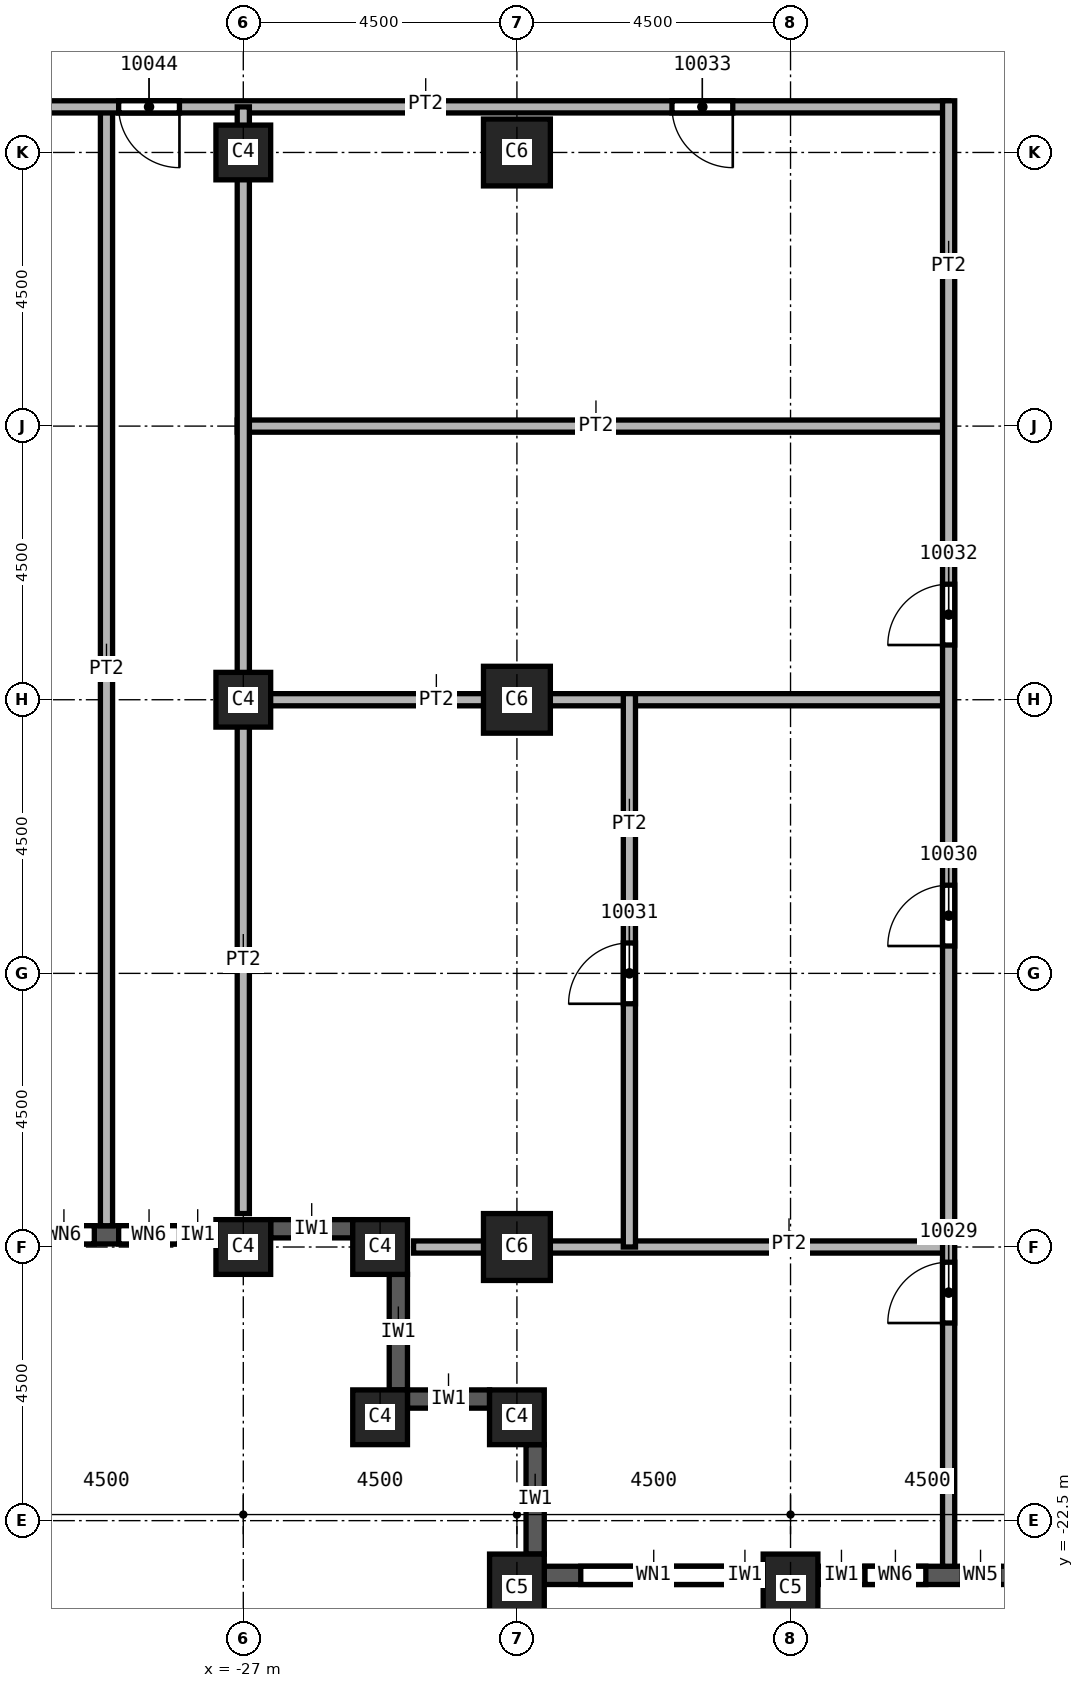
"""IFC4 building model, lengths in metres.
Left out: names, types, materials, properties, quantities, classifications, styles, units other than length and angle.
Written with IfcOpenShell. Run it as: python <this file> out.ifc"""

import sys

from ifc_helpers import new_model, si_unit, direction, frame, frame_2d, origin, origin_2d, place, context, subcontext, project, spatial, rectangle, extrude, element, fill, save


model = new_model("IFC4")
c1 = context("Model", 3, precision=1e-05, world=origin(), true_north=direction((0.0, 1.0)))
c2 = subcontext(c1, "Body", "Model", "MODEL_VIEW")
j1 = project(units=[si_unit("LENGTHUNIT", "METRE"), si_unit("PLANEANGLEUNIT", "RADIAN")], contexts=[c1])
p1 = place(None, origin())
s1 = spatial("IfcSite", under=j1, at=p1, CompositionType="ELEMENT")
p2 = place(p1, origin())
s2 = spatial("IfcBuilding", under=s1, at=p2, CompositionType="ELEMENT")
p3 = place(p2, frame((0.0, 0.0, 174.0)))
s3 = spatial("IfcBuildingStorey", under=s2, at=p3, CompositionType="ELEMENT", Elevation=174.0)
for number, where, z_axis, x_axis in (
    (1, (-22.5, 0.0, 0.0), (0.0, 0.0, 1.0), (1.0, 0.0, 0.0)),
    (2, (-22.5, -9.0, 0.0), (0.0, 0.0, 1.0), (1.0, 0.0, 0.0)),
    (3, (-22.5, -18.0, 0.0), (0.0, 0.0, 1.0), (1.0, 0.0, 0.0)),
):
    element("IfcColumn", number, at=place(p3, frame(where, z_axis=z_axis, x_axis=x_axis)), inside=s3, PredefinedType="COLUMN", context=c2, shape_type="SweptSolid", body=[
        extrude(rectangle(XDim=1.1, YDim=1.1, at=origin_2d()), origin(), (0.0, 0.0, 1.0), 3.59),
    ])
for number, where, z_axis, x_axis in (
    (4, (-18.0, -23.6, 0.0), (0.0, 0.0, 1.0), (1.0, 0.0, 0.0)),
    (5, (-22.5, -23.6, 0.0), (0.0, 0.0, 1.0), (1.0, 0.0, 0.0)),
):
    element("IfcColumn", number, at=place(p3, frame(where, z_axis=z_axis, x_axis=x_axis)), inside=s3, PredefinedType="COLUMN", context=c2, shape_type="SweptSolid", body=[
        extrude(rectangle(XDim=0.9, YDim=1.1, at=origin_2d()), origin(), (0.0, 0.0, 1.0), 3.59),
    ])
for number, where, z_axis, x_axis in (
    (6, (-27.0, 0.0, 0.0), (0.0, 0.0, 1.0), (1.0, 0.0, 0.0)),
    (7, (-27.0, -9.0, 0.0), (0.0, 0.0, 1.0), (1.0, 0.0, 0.0)),
    (8, (-27.0, -18.0, 0.0), (0.0, 0.0, 1.0), (1.0, 0.0, 0.0)),
    (9, (-22.5, -20.8, 0.0), (0.0, 0.0, 1.0), (1.0, 0.0, 0.0)),
    (10, (-24.75, -20.8, 0.0), (0.0, 0.0, 1.0), (1.0, 0.0, 0.0)),
    (11, (-24.75, -18.0, 0.0), (0.0, 0.0, 1.0), (1.0, 0.0, 0.0)),
):
    element("IfcColumn", number, at=place(p3, frame(where, z_axis=z_axis, x_axis=x_axis)), inside=s3, PredefinedType="COLUMN", context=c2, shape_type="SweptSolid", body=[
        extrude(rectangle(XDim=0.9, YDim=0.9, at=origin_2d()), origin(), (0.0, 0.0, 1.0), 3.59),
    ])
p4 = place(p3, frame((-31.05, -17.8, 0.0), z_axis=(0.0, 0.0, 1.0), x_axis=(1.0, 0.0, 0.0)))
e12 = element("IfcWall", 12, at=p4, inside=s3, PredefinedType="SOLIDWALL", context=c2, shape_type="SweptSolid", body=[
    extrude(rectangle(XDim=3.6, YDim=0.3, at=frame_2d((1.8, 0.0))), origin(), (0.0, 0.0, 1.0), 2.99),
])
p5 = place(p4, frame((0.6, 0.0, 0.8)))
e13 = element("IfcOpeningElement", 13, at=p5, cuts=e12, PredefinedType="OPENING", context=c2, shape_type="SweptSolid", body=[
    extrude(rectangle(XDim=1.0, YDim=1.95, at=frame_2d((0.5, 0.975))), frame((0.0, 0.15, 0.0), z_axis=(0.0, -1.0, 0.0), x_axis=(1.0, 0.0, 0.0)), (0.0, 0.0, 1.0), 0.3),
])
p6 = place(p4, frame((2.0, 0.0, 0.8)))
e14 = element("IfcOpeningElement", 14, at=p6, cuts=e12, PredefinedType="OPENING", context=c2, shape_type="SweptSolid", body=[
    extrude(rectangle(XDim=1.0, YDim=1.95, at=frame_2d((0.5, 0.975))), frame((0.0, 0.15, 0.0), z_axis=(0.0, -1.0, 0.0), x_axis=(1.0, 0.0, 0.0)), (0.0, 0.0, 1.0), 0.3),
])
p7 = place(p3, frame((-26.55, -17.7, 0.0), z_axis=(0.0, 0.0, 1.0), x_axis=(1.0, 0.0, 0.0)))
e15 = element("IfcWall", 15, at=p7, inside=s3, PredefinedType="SOLIDWALL", context=c2, shape_type="SweptSolid", body=[
    extrude(rectangle(XDim=1.35, YDim=0.3, at=frame_2d((0.675, 0.0))), origin(), (0.0, 0.0, 1.0), 2.99),
])
p8 = place(p3, frame((-24.45, -18.45, 0.0), z_axis=(0.0, 0.0, 1.0), x_axis=(0.0, -1.0, 0.0)))
e16 = element("IfcWall", 16, at=p8, inside=s3, PredefinedType="SOLIDWALL", context=c2, shape_type="SweptSolid", body=[
    extrude(rectangle(XDim=1.9, YDim=0.3, at=frame_2d((0.95, 0.0))), origin(), (0.0, 0.0, 1.0), 2.99),
])
p9 = place(p3, frame((-24.3, -20.5, 0.0), z_axis=(0.0, 0.0, 1.0), x_axis=(1.0, 0.0, 0.0)))
e17 = element("IfcWall", 17, at=p9, inside=s3, PredefinedType="SOLIDWALL", context=c2, shape_type="SweptSolid", body=[
    extrude(rectangle(XDim=1.35, YDim=0.3, at=frame_2d((0.675, 0.0))), origin(), (0.0, 0.0, 1.0), 2.99),
])
p10 = place(p3, frame((-22.2, -21.25, 0.0), z_axis=(0.0, 0.0, 1.0), x_axis=(0.0, -1.0, 0.0)))
e18 = element("IfcWall", 18, at=p10, inside=s3, PredefinedType="SOLIDWALL", context=c2, shape_type="SweptSolid", body=[
    extrude(rectangle(XDim=1.8, YDim=0.3, at=frame_2d((0.9, 0.0))), origin(), (0.0, 0.0, 1.0), 2.99),
])
p11 = place(p3, frame((-22.05, -23.4, 0.0), z_axis=(0.0, 0.0, 1.0), x_axis=(1.0, 0.0, 0.0)))
e19 = element("IfcWall", 19, at=p11, inside=s3, PredefinedType="SOLIDWALL", context=c2, shape_type="SweptSolid", body=[
    extrude(rectangle(XDim=3.6, YDim=0.3, at=frame_2d((1.8, 0.0))), origin(), (0.0, 0.0, 1.0), 2.99),
])
p12 = place(p11, frame((0.6, 0.0, 0.8)))
e20 = element("IfcOpeningElement", 20, at=p12, cuts=e19, PredefinedType="OPENING", context=c2, shape_type="SweptSolid", body=[
    extrude(rectangle(XDim=2.4, YDim=1.95, at=frame_2d((1.2, 0.975))), frame((0.0, 0.15, 0.0), z_axis=(0.0, -1.0, 0.0), x_axis=(1.0, 0.0, 0.0)), (0.0, 0.0, 1.0), 0.3),
])
p13 = place(p3, frame((-17.55, -23.4, 0.0), z_axis=(0.0, 0.0, 1.0), x_axis=(1.0, 0.0, 0.0)))
e21 = element("IfcWall", 21, at=p13, inside=s3, PredefinedType="SOLIDWALL", context=c2, shape_type="SweptSolid", body=[
    extrude(rectangle(XDim=3.6, YDim=0.3, at=frame_2d((1.8, 0.0))), origin(), (0.0, 0.0, 1.0), 2.99),
])
p14 = place(p13, frame((0.775, 0.0, 0.8)))
e22 = element("IfcOpeningElement", 22, at=p14, cuts=e21, PredefinedType="OPENING", context=c2, shape_type="SweptSolid", body=[
    extrude(rectangle(XDim=1.0, YDim=1.95, at=frame_2d((0.5, 0.975))), frame((0.0, 0.15, 0.0), z_axis=(0.0, -1.0, 0.0), x_axis=(1.0, 0.0, 0.0)), (0.0, 0.0, 1.0), 0.3),
])
p15 = place(p13, frame((2.375, 0.0, 0.8)))
e23 = element("IfcOpeningElement", 23, at=p15, cuts=e21, PredefinedType="OPENING", context=c2, shape_type="SweptSolid", body=[
    extrude(rectangle(XDim=0.6, YDim=1.95, at=frame_2d((0.3, 0.975))), frame((0.0, 0.15, 0.0), z_axis=(0.0, -1.0, 0.0), x_axis=(1.0, 0.0, 0.0)), (0.0, 0.0, 1.0), 0.3),
])
p16 = place(p3, frame((-29.25, 0.75, 0.0), z_axis=(0.0, 0.0, 1.0), x_axis=(0.0, -1.0, 0.0)))
e24 = element("IfcWall", 24, at=p16, inside=s3, PredefinedType="PARTITIONING", context=c2, shape_type="SweptSolid", body=[
    extrude(rectangle(XDim=18.4, YDim=0.2, at=frame_2d((9.2, 0.0))), origin(), (0.0, 0.0, 1.0), 3.59),
])
p17 = place(p3, frame((-15.4, 0.75, 0.0), z_axis=(0.0, 0.0, 1.0), x_axis=(-1.0, 0.0, 0.0)))
e25 = element("IfcWall", 25, at=p17, inside=s3, PredefinedType="PARTITIONING", context=c2, shape_type="SweptSolid", body=[
    extrude(rectangle(XDim=18.45, YDim=0.2, at=frame_2d((9.225, 0.0))), origin(), (0.0, 0.0, 1.0), 3.59),
])
p18 = place(p17, frame((3.55, 0.0, 0.0)))
e26 = element("IfcOpeningElement", 26, at=p18, cuts=e25, PredefinedType="OPENING", context=c2, shape_type="SweptSolid", body=[
    extrude(rectangle(XDim=1.0, YDim=2.1, at=frame_2d((0.5, 1.05))), frame((0.0, 0.1, 0.0), z_axis=(0.0, -1.0, 0.0), x_axis=(1.0, 0.0, 0.0)), (0.0, 0.0, 1.0), 0.2),
])
p19 = place(p17, frame((12.65, 0.0, 0.0)))
e27 = element("IfcOpeningElement", 27, at=p19, cuts=e25, PredefinedType="OPENING", context=c2, shape_type="SweptSolid", body=[
    extrude(rectangle(XDim=1.0, YDim=2.1, at=frame_2d((0.5, 1.05))), frame((0.0, 0.1, 0.0), z_axis=(0.0, -1.0, 0.0), x_axis=(1.0, 0.0, 0.0)), (0.0, 0.0, 1.0), 0.2),
])
for number, where, z_axis, x_axis in (
    (28, (-27.1, -9.0, 0.0), (0.0, 0.0, 1.0), (1.0, 0.0, 0.0)),
    (29, (-27.1, -4.5, 0.0), (0.0, 0.0, 1.0), (1.0, 0.0, 0.0)),
):
    element("IfcWall", number, at=place(p3, frame(where, z_axis=z_axis, x_axis=x_axis)), inside=s3, PredefinedType="PARTITIONING", context=c2, shape_type="SweptSolid", body=[
        extrude(rectangle(XDim=11.7, YDim=0.2, at=frame_2d((5.85, 0.0))), origin(), (0.0, 0.0, 1.0), 3.59),
    ])
p20 = place(p3, frame((-27.0, -17.45, 0.0), z_axis=(0.0, 0.0, 1.0), x_axis=(0.0, 1.0, 0.0)))
e30 = element("IfcWall", 30, at=p20, inside=s3, PredefinedType="PARTITIONING", context=c2, shape_type="SweptSolid", body=[
    extrude(rectangle(XDim=18.2, YDim=0.2, at=frame_2d((9.1, 0.0))), origin(), (0.0, 0.0, 1.0), 3.59),
])
p21 = place(p3, frame((-24.2, -18.0, 0.0), z_axis=(0.0, 0.0, 1.0), x_axis=(1.0, 0.0, 0.0)))
e31 = element("IfcWall", 31, at=p21, inside=s3, PredefinedType="PARTITIONING", context=c2, shape_type="SweptSolid", body=[
    extrude(rectangle(XDim=8.8, YDim=0.2, at=frame_2d((4.4, 0.0))), origin(), (0.0, 0.0, 1.0), 3.59),
])
p22 = place(p3, frame((-20.65, -18.0, 0.0), z_axis=(0.0, 0.0, 1.0), x_axis=(0.0, 1.0, 0.0)))
e32 = element("IfcWall", 32, at=p22, inside=s3, PredefinedType="PARTITIONING", context=c2, shape_type="SweptSolid", body=[
    extrude(rectangle(XDim=9.1, YDim=0.2, at=frame_2d((4.55, 0.0))), origin(), (0.0, 0.0, 1.0), 3.59),
])
p23 = place(p22, frame((4.0, 0.0, 0.0)))
e33 = element("IfcOpeningElement", 33, at=p23, cuts=e32, PredefinedType="OPENING", context=c2, shape_type="SweptSolid", body=[
    extrude(rectangle(XDim=1.0, YDim=2.1, at=frame_2d((0.5, 1.05))), frame((0.0, 0.1, 0.0), z_axis=(0.0, -1.0, 0.0), x_axis=(1.0, 0.0, 0.0)), (0.0, 0.0, 1.0), 0.2),
])
p24 = place(p3, frame((-15.4, -23.25, 0.0), z_axis=(0.0, 0.0, 1.0), x_axis=(0.0, 1.0, 0.0)))
e34 = element("IfcWall", 34, at=p24, inside=s3, PredefinedType="PARTITIONING", context=c2, shape_type="SweptSolid", body=[
    extrude(rectangle(XDim=24.1, YDim=0.2, at=frame_2d((12.05, 0.0))), origin(), (0.0, 0.0, 1.0), 3.59),
])
p25 = place(p24, frame((4.0, 0.0, 0.0)))
e35 = element("IfcOpeningElement", 35, at=p25, cuts=e34, PredefinedType="OPENING", context=c2, shape_type="SweptSolid", body=[
    extrude(rectangle(XDim=1.0, YDim=2.1, at=frame_2d((0.5, 1.05))), frame((0.0, 0.1, 0.0), z_axis=(0.0, -1.0, 0.0), x_axis=(1.0, 0.0, 0.0)), (0.0, 0.0, 1.0), 0.2),
])
p26 = place(p24, frame((10.2, 0.0, 0.0)))
e36 = element("IfcOpeningElement", 36, at=p26, cuts=e34, PredefinedType="OPENING", context=c2, shape_type="SweptSolid", body=[
    extrude(rectangle(XDim=1.0, YDim=2.1, at=frame_2d((0.5, 1.05))), frame((0.0, 0.1, 0.0), z_axis=(0.0, -1.0, 0.0), x_axis=(1.0, 0.0, 0.0)), (0.0, 0.0, 1.0), 0.2),
])
p27 = place(p24, frame((15.15, 0.0, 0.0)))
e37 = element("IfcOpeningElement", 37, at=p27, cuts=e34, PredefinedType="OPENING", context=c2, shape_type="SweptSolid", body=[
    extrude(rectangle(XDim=1.0, YDim=2.1, at=frame_2d((0.5, 1.05))), frame((0.0, 0.1, 0.0), z_axis=(0.0, -1.0, 0.0), x_axis=(1.0, 0.0, 0.0)), (0.0, 0.0, 1.0), 0.2),
])
p28 = place(p12, origin())
e38 = element("IfcWindow", 38, at=p28, inside=s3, PartitioningType="SINGLE_PANEL", PredefinedType="WINDOW", context=c2, shape_type="SweptSolid", body=[
    extrude(rectangle(XDim=2.4, YDim=1.95, at=frame_2d((1.2, 0.975))), frame((0.0, 0.03, 0.0), z_axis=(0.0, -1.0, 0.0), x_axis=(1.0, 0.0, 0.0)), (0.0, 0.0, 1.0), 0.06),
])
fill(e20, e38)
p29 = place(p25, origin())
e39 = element("IfcDoor", 39, at=p29, inside=s3, OperationType="SINGLE_SWING_RIGHT", PredefinedType="DOOR", context=c2, shape_type="SweptSolid", body=[
    extrude(rectangle(XDim=1.0, YDim=2.1, at=frame_2d((0.5, 1.05))), frame((0.0, 0.025, 0.0), z_axis=(0.0, -1.0, 0.0), x_axis=(1.0, 0.0, 0.0)), (0.0, 0.0, 1.0), 0.05),
])
fill(e35, e39)
p30 = place(p26, origin())
e40 = element("IfcDoor", 40, at=p30, inside=s3, OperationType="SINGLE_SWING_LEFT", PredefinedType="DOOR", context=c2, shape_type="SweptSolid", body=[
    extrude(rectangle(XDim=1.0, YDim=2.1, at=frame_2d((0.5, 1.05))), frame((0.0, 0.025, 0.0), z_axis=(0.0, -1.0, 0.0), x_axis=(1.0, 0.0, 0.0)), (0.0, 0.0, 1.0), 0.05),
])
fill(e36, e40)
p31 = place(p23, origin())
e41 = element("IfcDoor", 41, at=p31, inside=s3, OperationType="SINGLE_SWING_RIGHT", PredefinedType="DOOR", context=c2, shape_type="SweptSolid", body=[
    extrude(rectangle(XDim=1.0, YDim=2.1, at=frame_2d((0.5, 1.05))), frame((0.0, 0.025, 0.0), z_axis=(0.0, -1.0, 0.0), x_axis=(1.0, 0.0, 0.0)), (0.0, 0.0, 1.0), 0.05),
])
fill(e33, e41)
p32 = place(p27, origin())
e42 = element("IfcDoor", 42, at=p32, inside=s3, OperationType="SINGLE_SWING_LEFT", PredefinedType="DOOR", context=c2, shape_type="SweptSolid", body=[
    extrude(rectangle(XDim=1.0, YDim=2.1, at=frame_2d((0.5, 1.05))), frame((0.0, 0.025, 0.0), z_axis=(0.0, -1.0, 0.0), x_axis=(1.0, 0.0, 0.0)), (0.0, 0.0, 1.0), 0.05),
])
fill(e37, e42)
p33 = place(p18, origin())
e43 = element("IfcDoor", 43, at=p33, inside=s3, OperationType="SINGLE_SWING_RIGHT", PredefinedType="DOOR", context=c2, shape_type="SweptSolid", body=[
    extrude(rectangle(XDim=1.0, YDim=2.1, at=frame_2d((0.5, 1.05))), frame((0.0, 0.025, 0.0), z_axis=(0.0, -1.0, 0.0), x_axis=(1.0, 0.0, 0.0)), (0.0, 0.0, 1.0), 0.05),
])
fill(e26, e43)
p34 = place(p19, origin())
e44 = element("IfcDoor", 44, at=p34, inside=s3, OperationType="SINGLE_SWING_LEFT", PredefinedType="DOOR", context=c2, shape_type="SweptSolid", body=[
    extrude(rectangle(XDim=1.0, YDim=2.1, at=frame_2d((0.5, 1.05))), frame((0.0, 0.025, 0.0), z_axis=(0.0, -1.0, 0.0), x_axis=(1.0, 0.0, 0.0)), (0.0, 0.0, 1.0), 0.05),
])
fill(e27, e44)
p35 = place(p5, origin())
e45 = element("IfcWindow", 45, at=p35, inside=s3, PartitioningType="SINGLE_PANEL", PredefinedType="WINDOW", context=c2, shape_type="SweptSolid", body=[
    extrude(rectangle(XDim=1.0, YDim=1.95, at=frame_2d((0.5, 0.975))), frame((0.0, 0.03, 0.0), z_axis=(0.0, -1.0, 0.0), x_axis=(1.0, 0.0, 0.0)), (0.0, 0.0, 1.0), 0.06),
])
fill(e13, e45)
p36 = place(p6, origin())
e46 = element("IfcWindow", 46, at=p36, inside=s3, PartitioningType="SINGLE_PANEL", PredefinedType="WINDOW", context=c2, shape_type="SweptSolid", body=[
    extrude(rectangle(XDim=1.0, YDim=1.95, at=frame_2d((0.5, 0.975))), frame((0.0, 0.03, 0.0), z_axis=(0.0, -1.0, 0.0), x_axis=(1.0, 0.0, 0.0)), (0.0, 0.0, 1.0), 0.06),
])
fill(e14, e46)
p37 = place(p14, origin())
e47 = element("IfcWindow", 47, at=p37, inside=s3, PartitioningType="SINGLE_PANEL", PredefinedType="WINDOW", context=c2, shape_type="SweptSolid", body=[
    extrude(rectangle(XDim=1.0, YDim=1.95, at=frame_2d((0.5, 0.975))), frame((0.0, 0.03, 0.0), z_axis=(0.0, -1.0, 0.0), x_axis=(1.0, 0.0, 0.0)), (0.0, 0.0, 1.0), 0.06),
])
fill(e22, e47)
p38 = place(p15, origin())
e48 = element("IfcWindow", 48, at=p38, inside=s3, PartitioningType="SINGLE_PANEL", PredefinedType="WINDOW", context=c2, shape_type="SweptSolid", body=[
    extrude(rectangle(XDim=0.6, YDim=1.95, at=frame_2d((0.3, 0.975))), frame((0.0, 0.03, 0.0), z_axis=(0.0, -1.0, 0.0), x_axis=(1.0, 0.0, 0.0)), (0.0, 0.0, 1.0), 0.06),
])
fill(e23, e48)
save(model, sys.argv[1])
